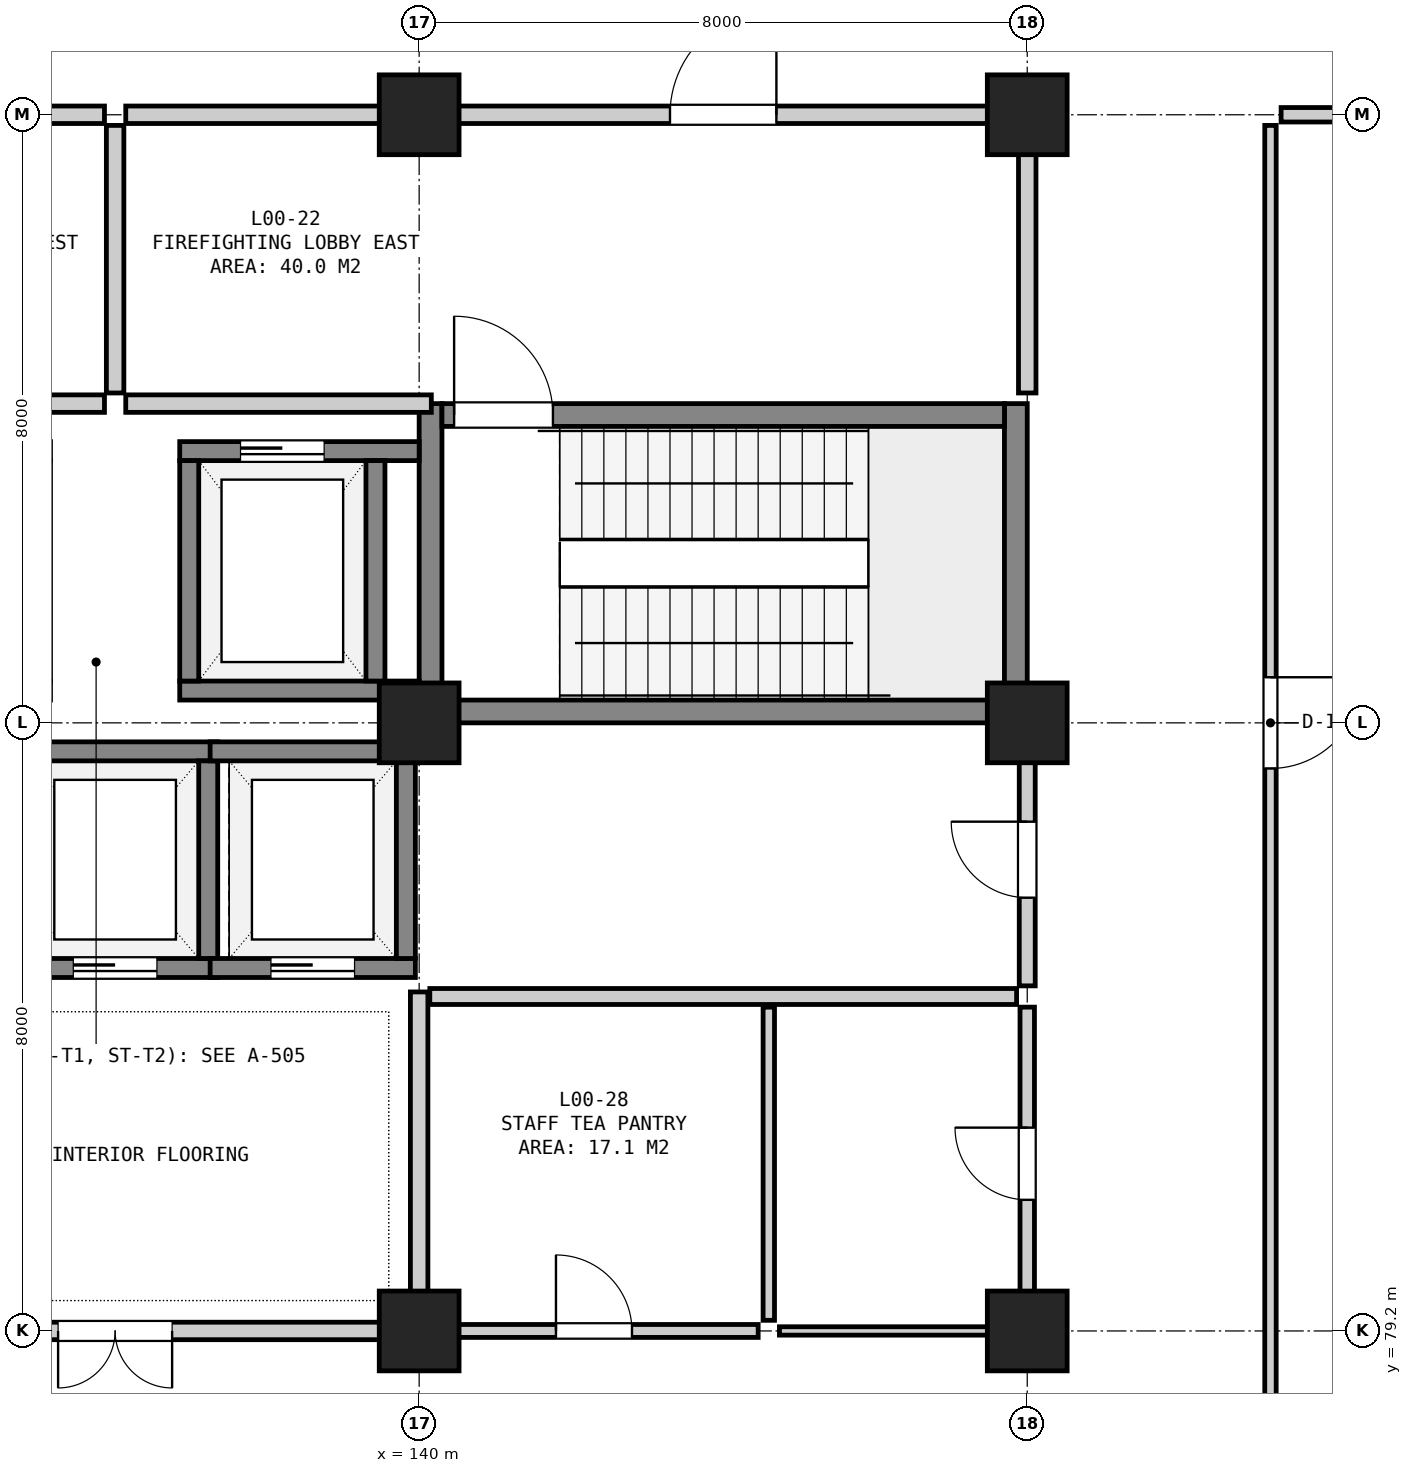
"""IFC4 building model, lengths in metres.
Left out: names, types, materials, properties, quantities, classifications, styles, units other than length and angle.
Written with IfcOpenShell. Run it as: python <this file> out.ifc"""

import sys

from ifc_helpers import new_model, si_unit, direction, frame, frame_2d, origin, origin_2d, place, context, subcontext, project, spatial, rectangle, extrude, element, fill, save


model = new_model("IFC4")
c1 = context("Model", 3, precision=1e-05, world=origin(), true_north=direction((0.0, 1.0)))
c2 = subcontext(c1, "Body", "Model", "MODEL_VIEW")
j1 = project(units=[si_unit("LENGTHUNIT", "METRE"), si_unit("PLANEANGLEUNIT", "RADIAN")], contexts=[c1])
p1 = place(None, origin())
s1 = spatial("IfcSite", under=j1, at=p1, CompositionType="ELEMENT")
p2 = place(p1, origin())
s2 = spatial("IfcBuilding", under=s1, at=p2, CompositionType="ELEMENT")
p3 = place(p2, origin())
s3 = spatial("IfcBuildingStorey", under=s2, at=p3, CompositionType="ELEMENT", Elevation=0.0)
for number, where, z_axis, x_axis in (
    (1, (140.0, 79.2, 0.0), (0.0, 0.0, 1.0), (1.0, 0.0, 0.0)),
    (2, (140.0, 87.2, 0.0), (0.0, 0.0, 1.0), (1.0, 0.0, 0.0)),
    (3, (140.0, 95.2, 0.0), (0.0, 0.0, 1.0), (1.0, 0.0, 0.0)),
    (4, (148.0, 79.2, 0.0), (0.0, 0.0, 1.0), (1.0, 0.0, 0.0)),
    (5, (148.0, 87.2, 0.0), (0.0, 0.0, 1.0), (1.0, 0.0, 0.0)),
    (6, (148.0, 95.2, 0.0), (0.0, 0.0, 1.0), (1.0, 0.0, 0.0)),
):
    element("IfcColumn", number, at=place(p3, frame(where, z_axis=z_axis, x_axis=x_axis)), inside=s3, PredefinedType="COLUMN", context=c2, shape_type="SweptSolid", body=[
        extrude(rectangle(XDim=1.05, YDim=1.05, at=origin_2d()), origin(), (0.0, 0.0, 1.0), 5.4),
    ])
for number, where, z_axis, x_axis in (
    (7, (140.15, 87.2, 0.0), (0.0, 0.0, 1.0), (0.0, 1.0, 0.0)),
    (8, (147.85, 87.2, 0.0), (0.0, 0.0, 1.0), (0.0, 1.0, 0.0)),
):
    element("IfcWall", number, at=place(p3, frame(where, z_axis=z_axis, x_axis=x_axis)), inside=s3, PredefinedType="SHEAR", context=c2, shape_type="SweptSolid", body=[
        extrude(rectangle(XDim=4.2, YDim=0.3, at=frame_2d((2.1, 0.0))), origin(), (0.0, 0.0, 1.0), 5.08),
    ])
p4 = place(p3, frame((140.3, 87.35, 0.0), z_axis=(0.0, 0.0, 1.0), x_axis=(1.0, 0.0, 0.0)))
e9 = element("IfcWall", 9, at=p4, inside=s3, PredefinedType="SHEAR", context=c2, shape_type="SweptSolid", body=[
    extrude(rectangle(XDim=7.4, YDim=0.3, at=frame_2d((3.7, 0.0))), origin(), (0.0, 0.0, 1.0), 5.08),
])
p5 = place(p3, frame((140.3, 91.25, 0.0), z_axis=(0.0, 0.0, 1.0), x_axis=(1.0, 0.0, 0.0)))
e10 = element("IfcWall", 10, at=p5, inside=s3, PredefinedType="SHEAR", context=c2, shape_type="SweptSolid", body=[
    extrude(rectangle(XDim=7.4, YDim=0.3, at=frame_2d((3.7, 0.0))), origin(), (0.0, 0.0, 1.0), 5.08),
])
p6 = place(p5, frame((0.16, 0.0, 0.0)))
e11 = element("IfcOpeningElement", 11, at=p6, cuts=e10, PredefinedType="OPENING", context=c2, shape_type="SweptSolid", body=[
    extrude(rectangle(XDim=1.3, YDim=2.18, at=frame_2d((0.65, 1.09))), frame((0.0, 0.162, 0.0), z_axis=(0.0, -1.0, 0.0), x_axis=(1.0, 0.0, 0.0)), (0.0, 0.0, 1.0), 0.324),
])
p7 = place(p3, frame((136.85, 87.625, 0.0), z_axis=(0.0, 0.0, 1.0), x_axis=(1.0, 0.0, 0.0)))
e12 = element("IfcWall", 12, at=p7, inside=s3, PredefinedType="SHEAR", context=c2, shape_type="SweptSolid", body=[
    extrude(rectangle(XDim=3.15, YDim=0.25, at=frame_2d((1.575, 0.0))), origin(), (0.0, 0.0, 1.0), 5.08),
])
p8 = place(p3, frame((136.85, 90.775, 0.0), z_axis=(0.0, 0.0, 1.0), x_axis=(1.0, 0.0, 0.0)))
e13 = element("IfcWall", 13, at=p8, inside=s3, PredefinedType="SHEAR", context=c2, shape_type="SweptSolid", body=[
    extrude(rectangle(XDim=3.15, YDim=0.25, at=frame_2d((1.575, 0.0))), origin(), (0.0, 0.0, 1.0), 5.08),
])
p9 = place(p8, frame((0.8, 0.0, 0.0)))
e14 = element("IfcOpeningElement", 14, at=p9, cuts=e13, PredefinedType="OPENING", context=c2, shape_type="SweptSolid", body=[
    extrude(rectangle(XDim=1.1, YDim=2.15, at=frame_2d((0.55, 1.075))), frame((0.0, 0.137, 0.0), z_axis=(0.0, -1.0, 0.0), x_axis=(1.0, 0.0, 0.0)), (0.0, 0.0, 1.0), 0.274),
])
for number, where, z_axis, x_axis in (
    (15, (136.975, 87.75, 0.0), (0.0, 0.0, 1.0), (0.0, 1.0, 0.0)),
    (16, (139.425, 87.75, 0.0), (0.0, 0.0, 1.0), (0.0, 1.0, 0.0)),
):
    element("IfcWall", number, at=place(p3, frame(where, z_axis=z_axis, x_axis=x_axis)), inside=s3, PredefinedType="SHEAR", context=c2, shape_type="SweptSolid", body=[
        extrude(rectangle(XDim=2.9, YDim=0.25, at=frame_2d((1.45, 0.0))), origin(), (0.0, 0.0, 1.0), 5.08),
    ])
p10 = place(p3, frame((134.65, 83.975, 0.0), z_axis=(0.0, 0.0, 1.0), x_axis=(1.0, 0.0, 0.0)))
e17 = element("IfcWall", 17, at=p10, inside=s3, PredefinedType="SHEAR", context=c2, shape_type="SweptSolid", body=[
    extrude(rectangle(XDim=2.7, YDim=0.25, at=frame_2d((1.35, 0.0))), origin(), (0.0, 0.0, 1.0), 5.08),
])
p11 = place(p10, frame((0.8, 0.0, 0.0)))
e18 = element("IfcOpeningElement", 18, at=p11, cuts=e17, PredefinedType="OPENING", context=c2, shape_type="SweptSolid", body=[
    extrude(rectangle(XDim=1.1, YDim=2.15, at=frame_2d((0.55, 1.075))), frame((0.0, 0.137, 0.0), z_axis=(0.0, -1.0, 0.0), x_axis=(1.0, 0.0, 0.0)), (0.0, 0.0, 1.0), 0.274),
])
p12 = place(p3, frame((134.65, 86.825, 0.0), z_axis=(0.0, 0.0, 1.0), x_axis=(1.0, 0.0, 0.0)))
e19 = element("IfcWall", 19, at=p12, inside=s3, PredefinedType="SHEAR", context=c2, shape_type="SweptSolid", body=[
    extrude(rectangle(XDim=2.7, YDim=0.25, at=frame_2d((1.35, 0.0))), origin(), (0.0, 0.0, 1.0), 5.08),
])
p13 = place(p3, frame((137.225, 84.1, 0.0), z_axis=(0.0, 0.0, 1.0), x_axis=(0.0, 1.0, 0.0)))
e20 = element("IfcWall", 20, at=p13, inside=s3, PredefinedType="SHEAR", context=c2, shape_type="SweptSolid", body=[
    extrude(rectangle(XDim=2.6, YDim=0.25, at=frame_2d((1.3, 0.0))), origin(), (0.0, 0.0, 1.0), 5.08),
])
p14 = place(p3, frame((137.25, 83.975, 0.0), z_axis=(0.0, 0.0, 1.0), x_axis=(1.0, 0.0, 0.0)))
e21 = element("IfcWall", 21, at=p14, inside=s3, PredefinedType="SHEAR", context=c2, shape_type="SweptSolid", body=[
    extrude(rectangle(XDim=2.7, YDim=0.25, at=frame_2d((1.35, 0.0))), origin(), (0.0, 0.0, 1.0), 5.08),
])
p15 = place(p14, frame((0.8, 0.0, 0.0)))
e22 = element("IfcOpeningElement", 22, at=p15, cuts=e21, PredefinedType="OPENING", context=c2, shape_type="SweptSolid", body=[
    extrude(rectangle(XDim=1.1, YDim=2.15, at=frame_2d((0.55, 1.075))), frame((0.0, 0.137, 0.0), z_axis=(0.0, -1.0, 0.0), x_axis=(1.0, 0.0, 0.0)), (0.0, 0.0, 1.0), 0.274),
])
p16 = place(p3, frame((137.25, 86.825, 0.0), z_axis=(0.0, 0.0, 1.0), x_axis=(1.0, 0.0, 0.0)))
e23 = element("IfcWall", 23, at=p16, inside=s3, PredefinedType="SHEAR", context=c2, shape_type="SweptSolid", body=[
    extrude(rectangle(XDim=2.7, YDim=0.25, at=frame_2d((1.35, 0.0))), origin(), (0.0, 0.0, 1.0), 5.08),
])
p17 = place(p3, frame((139.825, 84.1, 0.0), z_axis=(0.0, 0.0, 1.0), x_axis=(0.0, 1.0, 0.0)))
e24 = element("IfcWall", 24, at=p17, inside=s3, PredefinedType="SHEAR", context=c2, shape_type="SweptSolid", body=[
    extrude(rectangle(XDim=2.6, YDim=0.25, at=frame_2d((1.3, 0.0))), origin(), (0.0, 0.0, 1.0), 5.08),
])
p18 = place(p3, frame((131.84, 91.4, 0.0), z_axis=(0.0, 0.0, 1.0), x_axis=(1.0, 0.0, 0.0)))
e25 = element("IfcWall", 25, at=p18, inside=s3, PredefinedType="SOLIDWALL", context=c2, shape_type="SweptSolid", body=[
    extrude(rectangle(XDim=4.02, YDim=0.23, at=frame_2d((2.01, 0.0))), origin(), (0.0, 0.0, 1.0), 5.08),
])
p19 = place(p3, frame((124.14, 95.2, 0.0), z_axis=(0.0, 0.0, 1.0), x_axis=(1.0, 0.0, 0.0)))
e26 = element("IfcWall", 26, at=p19, inside=s3, PredefinedType="SOLIDWALL", context=c2, shape_type="SweptSolid", body=[
    extrude(rectangle(XDim=11.72, YDim=0.23, at=frame_2d((5.86, 0.0))), origin(), (0.0, 0.0, 1.0), 4.475),
])
p20 = place(p19, frame((3.16, 0.0, 0.0)))
e27 = element("IfcOpeningElement", 27, at=p20, cuts=e26, PredefinedType="OPENING", context=c2, shape_type="SweptSolid", body=[
    extrude(rectangle(XDim=1.4, YDim=2.2, at=frame_2d((0.7, 1.1))), frame((0.0, 0.127, 0.0), z_axis=(0.0, -1.0, 0.0), x_axis=(1.0, 0.0, 0.0)), (0.0, 0.0, 1.0), 0.254),
])
p21 = place(p3, frame((136.0, 91.54, 0.0), z_axis=(0.0, 0.0, 1.0), x_axis=(0.0, 1.0, 0.0)))
e28 = element("IfcWall", 28, at=p21, inside=s3, PredefinedType="SOLIDWALL", context=c2, shape_type="SweptSolid", body=[
    extrude(rectangle(XDim=3.52, YDim=0.23, at=frame_2d((1.76, 0.0))), origin(), (0.0, 0.0, 1.0), 5.08),
])
p22 = place(p3, frame((136.14, 91.4, 0.0), z_axis=(0.0, 0.0, 1.0), x_axis=(1.0, 0.0, 0.0)))
e29 = element("IfcWall", 29, at=p22, inside=s3, PredefinedType="SOLIDWALL", context=c2, shape_type="SweptSolid", body=[
    extrude(rectangle(XDim=4.02, YDim=0.23, at=frame_2d((2.01, 0.0))), origin(), (0.0, 0.0, 1.0), 5.08),
])
p23 = place(p3, frame((136.14, 95.2, 0.0), z_axis=(0.0, 0.0, 1.0), x_axis=(1.0, 0.0, 0.0)))
e30 = element("IfcWall", 30, at=p23, inside=s3, PredefinedType="SOLIDWALL", context=c2, shape_type="SweptSolid", body=[
    extrude(rectangle(XDim=11.72, YDim=0.23, at=frame_2d((5.86, 0.0))), origin(), (0.0, 0.0, 1.0), 4.525),
])
p24 = place(p23, frame((7.16, 0.0, 0.0)))
e31 = element("IfcOpeningElement", 31, at=p24, cuts=e30, PredefinedType="OPENING", context=c2, shape_type="SweptSolid", body=[
    extrude(rectangle(XDim=1.4, YDim=2.2, at=frame_2d((0.7, 1.1))), frame((0.0, 0.127, 0.0), z_axis=(0.0, -1.0, 0.0), x_axis=(1.0, 0.0, 0.0)), (0.0, 0.0, 1.0), 0.254),
])
p25 = place(p3, frame((148.0, 91.54, 0.0), z_axis=(0.0, 0.0, 1.0), x_axis=(0.0, 1.0, 0.0)))
e32 = element("IfcWall", 32, at=p25, inside=s3, PredefinedType="SOLIDWALL", context=c2, shape_type="SweptSolid", body=[
    extrude(rectangle(XDim=3.52, YDim=0.23, at=frame_2d((1.76, 0.0))), origin(), (0.0, 0.0, 1.0), 4.425),
])
p26 = place(p3, frame((132.14, 79.2, 0.0), z_axis=(0.0, 0.0, 1.0), x_axis=(1.0, 0.0, 0.0)))
e33 = element("IfcWall", 33, at=p26, inside=s3, PredefinedType="SOLIDWALL", context=c2, shape_type="SweptSolid", body=[
    extrude(rectangle(XDim=7.72, YDim=0.23, at=frame_2d((3.86, 0.0))), origin(), (0.0, 0.0, 1.0), 4.475),
])
p27 = place(p26, frame((3.11, 0.0, 0.0)))
e34 = element("IfcOpeningElement", 34, at=p27, cuts=e33, PredefinedType="OPENING", context=c2, shape_type="SweptSolid", body=[
    extrude(rectangle(XDim=1.5, YDim=2.2, at=frame_2d((0.75, 1.1))), frame((0.0, 0.127, 0.0), z_axis=(0.0, -1.0, 0.0), x_axis=(1.0, 0.0, 0.0)), (0.0, 0.0, 1.0), 0.254),
])
p28 = place(p3, frame((140.0, 79.34, 0.0), z_axis=(0.0, 0.0, 1.0), x_axis=(0.0, 1.0, 0.0)))
e35 = element("IfcWall", 35, at=p28, inside=s3, PredefinedType="SOLIDWALL", context=c2, shape_type="SweptSolid", body=[
    extrude(rectangle(XDim=4.32, YDim=0.23, at=frame_2d((2.16, 0.0))), origin(), (0.0, 0.0, 1.0), 4.325),
])
p29 = place(p3, frame((140.14, 83.6, 0.0), z_axis=(0.0, 0.0, 1.0), x_axis=(1.0, 0.0, 0.0)))
e36 = element("IfcWall", 36, at=p29, inside=s3, PredefinedType="SOLIDWALL", context=c2, shape_type="SweptSolid", body=[
    extrude(rectangle(XDim=7.72, YDim=0.21, at=frame_2d((3.86, 0.0))), origin(), (0.0, 0.0, 1.0), 5.08),
])
p30 = place(p3, frame((148.0, 83.74, 0.0), z_axis=(0.0, 0.0, 1.0), x_axis=(0.0, 1.0, 0.0)))
e37 = element("IfcWall", 37, at=p30, inside=s3, PredefinedType="SOLIDWALL", context=c2, shape_type="SweptSolid", body=[
    extrude(rectangle(XDim=3.32, YDim=0.21, at=frame_2d((1.66, 0.0))), origin(), (0.0, 0.0, 1.0), 4.375),
])
p31 = place(p30, frame((1.16, 0.0, 0.0)))
e38 = element("IfcOpeningElement", 38, at=p31, cuts=e37, PredefinedType="OPENING", context=c2, shape_type="SweptSolid", body=[
    extrude(rectangle(XDim=1.0, YDim=2.15, at=frame_2d((0.5, 1.075))), frame((0.0, 0.117, 0.0), z_axis=(0.0, -1.0, 0.0), x_axis=(1.0, 0.0, 0.0)), (0.0, 0.0, 1.0), 0.234),
])
p32 = place(p3, frame((140.14, 79.2, 0.0), z_axis=(0.0, 0.0, 1.0), x_axis=(1.0, 0.0, 0.0)))
e39 = element("IfcWall", 39, at=p32, inside=s3, PredefinedType="PARTITIONING", context=c2, shape_type="SweptSolid", body=[
    extrude(rectangle(XDim=4.32, YDim=0.17, at=frame_2d((2.16, 0.0))), origin(), (0.0, 0.0, 1.0), 4.475),
])
p33 = place(p32, frame((1.66, 0.0, 0.0)))
e40 = element("IfcOpeningElement", 40, at=p33, cuts=e39, PredefinedType="OPENING", context=c2, shape_type="SweptSolid", body=[
    extrude(rectangle(XDim=1.0, YDim=2.15, at=frame_2d((0.5, 1.075))), frame((0.0, 0.097, 0.0), z_axis=(0.0, -1.0, 0.0), x_axis=(1.0, 0.0, 0.0)), (0.0, 0.0, 1.0), 0.194),
])
p34 = place(p3, frame((144.6, 79.34, 0.0), z_axis=(0.0, 0.0, 1.0), x_axis=(0.0, 1.0, 0.0)))
e41 = element("IfcWall", 41, at=p34, inside=s3, PredefinedType="PARTITIONING", context=c2, shape_type="SweptSolid", body=[
    extrude(rectangle(XDim=4.12, YDim=0.15, at=frame_2d((2.06, 0.0))), origin(), (0.0, 0.0, 1.0), 5.08),
])
p35 = place(p3, frame((144.74, 79.2, 0.0), z_axis=(0.0, 0.0, 1.0), x_axis=(1.0, 0.0, 0.0)))
e42 = element("IfcWall", 42, at=p35, inside=s3, PredefinedType="PARTITIONING", context=c2, shape_type="SweptSolid", body=[
    extrude(rectangle(XDim=3.12, YDim=0.11, at=frame_2d((1.56, 0.0))), origin(), (0.0, 0.0, 1.0), 4.475),
])
p36 = place(p3, frame((148.0, 79.34, 0.0), z_axis=(0.0, 0.0, 1.0), x_axis=(0.0, 1.0, 0.0)))
e43 = element("IfcWall", 43, at=p36, inside=s3, PredefinedType="PARTITIONING", context=c2, shape_type="SweptSolid", body=[
    extrude(rectangle(XDim=4.12, YDim=0.19, at=frame_2d((2.06, 0.0))), origin(), (0.0, 0.0, 1.0), 4.375),
])
p37 = place(p36, frame((1.585, 0.0, 0.0)))
e44 = element("IfcOpeningElement", 44, at=p37, cuts=e43, PredefinedType="OPENING", context=c2, shape_type="SweptSolid", body=[
    extrude(rectangle(XDim=0.95, YDim=2.15, at=frame_2d((0.475, 1.075))), frame((0.0, 0.107, 0.0), z_axis=(0.0, -1.0, 0.0), x_axis=(1.0, 0.0, 0.0)), (0.0, 0.0, 1.0), 0.214),
])
p38 = place(p3, frame((151.34, 95.2, 0.0), z_axis=(0.0, 0.0, 1.0), x_axis=(1.0, 0.0, 0.0)))
e45 = element("IfcWall", 45, at=p38, inside=s3, PredefinedType="PARTITIONING", context=c2, shape_type="SweptSolid", body=[
    extrude(rectangle(XDim=16.555, YDim=0.19, at=frame_2d((8.277, 0.0))), origin(), (0.0, 0.0, 1.0), 4.025),
])
p39 = place(p3, frame((151.2, 76.0, 0.0), z_axis=(0.0, 0.0, 1.0), x_axis=(0.0, 1.0, 0.0)))
e46 = element("IfcWall", 46, at=p39, inside=s3, PredefinedType="PARTITIONING", context=c2, shape_type="SweptSolid", body=[
    extrude(rectangle(XDim=19.06, YDim=0.15, at=frame_2d((9.53, 0.0))), origin(), (0.0, 0.0, 1.0), 5.08),
])
p40 = place(p39, frame((10.6, 0.0, 0.0)))
e47 = element("IfcOpeningElement", 47, at=p40, cuts=e46, PredefinedType="OPENING", context=c2, shape_type="SweptSolid", body=[
    extrude(rectangle(XDim=1.2, YDim=2.15, at=frame_2d((0.6, 1.075))), frame((0.0, 0.087, 0.0), z_axis=(0.0, -1.0, 0.0), x_axis=(1.0, 0.0, 0.0)), (0.0, 0.0, 1.0), 0.174),
])
p41 = place(p6, origin())
e48 = element("IfcDoor", 48, at=p41, inside=s3, OperationType="SINGLE_SWING_LEFT", PredefinedType="DOOR", context=c2, shape_type="SweptSolid", body=[
    extrude(rectangle(XDim=1.3, YDim=2.18, at=frame_2d((0.65, 1.09))), frame((0.0, 0.025, 0.0), z_axis=(0.0, -1.0, 0.0), x_axis=(1.0, 0.0, 0.0)), (0.0, 0.0, 1.0), 0.05),
])
fill(e11, e48)
p42 = place(p9, origin())
e49 = element("IfcDoor", 49, at=p42, inside=s3, OperationType="SLIDING_TO_LEFT", PredefinedType="DOOR", context=c2, shape_type="SweptSolid", body=[
    extrude(rectangle(XDim=1.1, YDim=2.15, at=frame_2d((0.55, 1.075))), frame((0.0, 0.025, 0.0), z_axis=(0.0, -1.0, 0.0), x_axis=(1.0, 0.0, 0.0)), (0.0, 0.0, 1.0), 0.05),
])
fill(e14, e49)
p43 = place(p11, origin())
e50 = element("IfcDoor", 50, at=p43, inside=s3, OperationType="SLIDING_TO_LEFT", PredefinedType="DOOR", context=c2, shape_type="SweptSolid", body=[
    extrude(rectangle(XDim=1.1, YDim=2.15, at=frame_2d((0.55, 1.075))), frame((0.0, 0.025, 0.0), z_axis=(0.0, -1.0, 0.0), x_axis=(1.0, 0.0, 0.0)), (0.0, 0.0, 1.0), 0.05),
])
fill(e18, e50)
p44 = place(p15, origin())
e51 = element("IfcDoor", 51, at=p44, inside=s3, OperationType="SLIDING_TO_LEFT", PredefinedType="DOOR", context=c2, shape_type="SweptSolid", body=[
    extrude(rectangle(XDim=1.1, YDim=2.15, at=frame_2d((0.55, 1.075))), frame((0.0, 0.025, 0.0), z_axis=(0.0, -1.0, 0.0), x_axis=(1.0, 0.0, 0.0)), (0.0, 0.0, 1.0), 0.05),
])
fill(e22, e51)
p45 = place(p24, origin())
e52 = element("IfcDoor", 52, at=p45, inside=s3, OperationType="SINGLE_SWING_RIGHT", PredefinedType="DOOR", context=c2, shape_type="SweptSolid", body=[
    extrude(rectangle(XDim=1.4, YDim=2.2, at=frame_2d((0.7, 1.1))), frame((0.0, 0.025, 0.0), z_axis=(0.0, -1.0, 0.0), x_axis=(1.0, 0.0, 0.0)), (0.0, 0.0, 1.0), 0.05),
])
fill(e31, e52)
p46 = place(p27, frame((1.5, 0.0, 0.0), z_axis=(0.0, 0.0, 1.0), x_axis=(-1.0, 0.0, 0.0)))
e53 = element("IfcDoor", 53, at=p46, inside=s3, OperationType="DOUBLE_DOOR_SINGLE_SWING", PredefinedType="DOOR", context=c2, shape_type="SweptSolid", body=[
    extrude(rectangle(XDim=1.5, YDim=2.2, at=frame_2d((0.75, 1.1))), frame((0.0, 0.025, 0.0), z_axis=(0.0, -1.0, 0.0), x_axis=(1.0, 0.0, 0.0)), (0.0, 0.0, 1.0), 0.05),
])
fill(e34, e53)
p47 = place(p31, origin())
e54 = element("IfcDoor", 54, at=p47, inside=s3, OperationType="SINGLE_SWING_RIGHT", PredefinedType="DOOR", context=c2, shape_type="SweptSolid", body=[
    extrude(rectangle(XDim=1.0, YDim=2.15, at=frame_2d((0.5, 1.075))), frame((0.0, 0.025, 0.0), z_axis=(0.0, -1.0, 0.0), x_axis=(1.0, 0.0, 0.0)), (0.0, 0.0, 1.0), 0.05),
])
fill(e38, e54)
p48 = place(p33, origin())
e55 = element("IfcDoor", 55, at=p48, inside=s3, OperationType="SINGLE_SWING_LEFT", PredefinedType="DOOR", context=c2, shape_type="SweptSolid", body=[
    extrude(rectangle(XDim=1.0, YDim=2.15, at=frame_2d((0.5, 1.075))), frame((0.0, 0.025, 0.0), z_axis=(0.0, -1.0, 0.0), x_axis=(1.0, 0.0, 0.0)), (0.0, 0.0, 1.0), 0.05),
])
fill(e40, e55)
p49 = place(p37, origin())
e56 = element("IfcDoor", 56, at=p49, inside=s3, OperationType="SINGLE_SWING_RIGHT", PredefinedType="DOOR", context=c2, shape_type="SweptSolid", body=[
    extrude(rectangle(XDim=0.95, YDim=2.15, at=frame_2d((0.475, 1.075))), frame((0.0, 0.025, 0.0), z_axis=(0.0, -1.0, 0.0), x_axis=(1.0, 0.0, 0.0)), (0.0, 0.0, 1.0), 0.05),
])
fill(e44, e56)
p50 = place(p40, frame((1.2, 0.0, 0.0), z_axis=(0.0, 0.0, 1.0), x_axis=(-1.0, 0.0, 0.0)))
e57 = element("IfcDoor", 57, at=p50, inside=s3, OperationType="SINGLE_SWING_LEFT", PredefinedType="DOOR", context=c2, shape_type="SweptSolid", body=[
    extrude(rectangle(XDim=1.2, YDim=2.15, at=frame_2d((0.6, 1.075))), frame((0.0, 0.025, 0.0), z_axis=(0.0, -1.0, 0.0), x_axis=(1.0, 0.0, 0.0)), (0.0, 0.0, 1.0), 0.05),
])
fill(e47, e57)
save(model, sys.argv[1])
